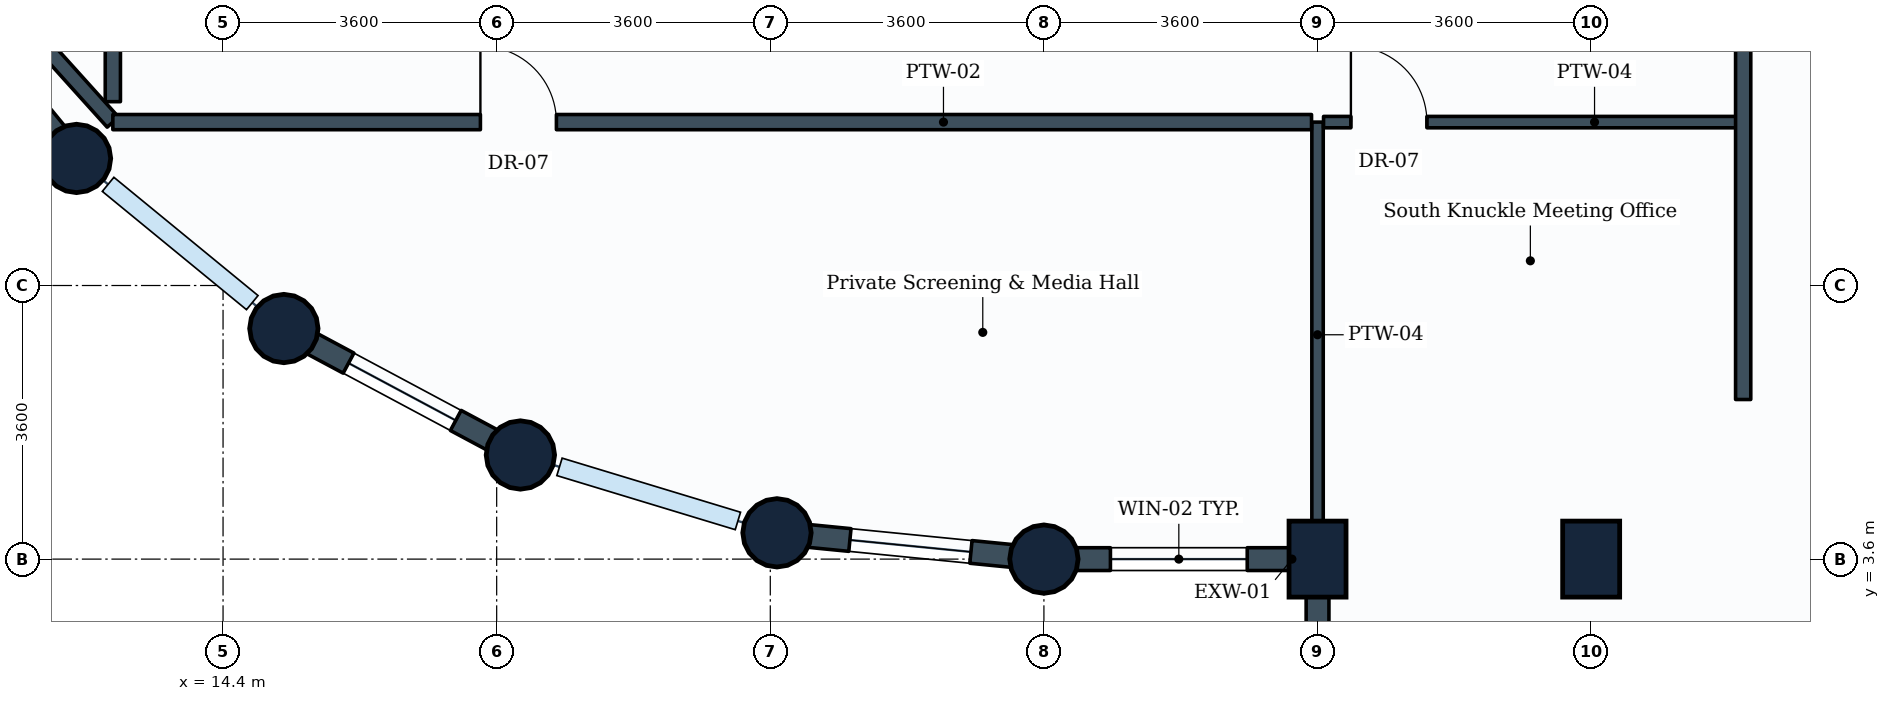
"""IFC4 building model, lengths in metres.
Left out: names, types, materials, properties, quantities, classifications, styles, units other than length and angle.
Written with IfcOpenShell. Run it as: python <this file> out.ifc"""

import sys

from ifc_helpers import new_model, si_unit, direction, frame, frame_2d, origin, origin_2d, place, context, subcontext, project, spatial, rectangle, circle, extrude, element, fill, save


model = new_model("IFC4")
c1 = context("Model", 3, precision=1e-05, world=origin(), true_north=direction((0.0, 1.0)))
c2 = subcontext(c1, "Body", "Model", "MODEL_VIEW")
j1 = project(units=[si_unit("LENGTHUNIT", "METRE"), si_unit("PLANEANGLEUNIT", "RADIAN")], contexts=[c1])
p1 = place(None, origin())
s1 = spatial("IfcSite", under=j1, at=p1, CompositionType="ELEMENT")
p2 = place(p1, origin())
s2 = spatial("IfcBuilding", under=s1, at=p2, CompositionType="ELEMENT")
p3 = place(p2, frame((0.0, 0.0, 135.2)))
s3 = spatial("IfcBuildingStorey", under=s2, at=p3, CompositionType="ELEMENT", Elevation=135.2)
for number, where, z_axis, x_axis in (
    (1, (12.472, 8.872, 0.0), (0.0, 0.0, 1.0), (1.0, 0.0, 0.0)),
    (2, (15.2, 6.634, 0.0), (0.0, 0.0, 1.0), (1.0, 0.0, 0.0)),
    (3, (18.312, 4.97, 0.0), (0.0, 0.0, 1.0), (1.0, 0.0, 0.0)),
    (4, (21.688, 3.946, 0.0), (0.0, 0.0, 1.0), (1.0, 0.0, 0.0)),
    (5, (25.2, 3.6, 0.0), (0.0, 0.0, 1.0), (1.0, 0.0, 0.0)),
):
    element("IfcColumn", number, at=place(p3, frame(where, z_axis=z_axis, x_axis=x_axis)), inside=s3, PredefinedType="COLUMN", context=c2, shape_type="SweptSolid", body=[
        extrude(circle(Radius=0.45, at=origin_2d()), origin(), (0.0, 0.0, 1.0), 3.8),
    ])
for number, where, z_axis, x_axis in (
    (6, (28.8, 3.6, 0.0), (0.0, 0.0, 1.0), (1.0, 0.0, 0.0)),
    (7, (32.4, 3.6, 0.0), (0.0, 0.0, 1.0), (1.0, 0.0, 0.0)),
):
    element("IfcColumn", number, at=place(p3, frame(where, z_axis=z_axis, x_axis=x_axis)), inside=s3, PredefinedType="COLUMN", context=c2, shape_type="SweptSolid", body=[
        extrude(rectangle(XDim=0.75, YDim=1.0, at=origin_2d()), origin(), (0.0, 0.0, 1.0), 3.8),
    ])
p4 = place(p3, frame((28.8, 3.6, 0.0), z_axis=(0.0, 0.0, 1.0), x_axis=(-1.0, 0.0, 0.0)))
e8 = element("IfcWall", 8, at=p4, inside=s3, PredefinedType="STANDARD", context=c2, shape_type="SweptSolid", body=[
    extrude(rectangle(XDim=3.6, YDim=0.3, at=frame_2d((1.8, 0.0))), origin(), (0.0, 0.0, 1.0), 2.93),
])
p5 = place(p4, frame((0.925, 0.0, 0.85)))
e9 = element("IfcOpeningElement", 9, at=p5, cuts=e8, PredefinedType="OPENING", context=c2, shape_type="SweptSolid", body=[
    extrude(rectangle(XDim=1.8, YDim=1.35, at=frame_2d((0.9, 0.675))), frame((0.0, 0.16, 0.0), z_axis=(0.0, -1.0, 0.0), x_axis=(1.0, 0.0, 0.0)), (0.0, 0.0, 1.0), 0.32),
])
p6 = place(p3, frame((28.8, 3.6, 0.0), z_axis=(0.0, 0.0, 1.0), x_axis=(0.0, -1.0, 0.0)))
e10 = element("IfcWall", 10, at=p6, inside=s3, PredefinedType="STANDARD", context=c2, shape_type="SweptSolid", body=[
    extrude(rectangle(XDim=2.1, YDim=0.3, at=frame_2d((1.05, 0.0))), origin(), (0.0, 0.0, 1.0), 2.93),
])
p7 = place(p3, frame((12.472, 8.872, 0.0), z_axis=(0.0, 0.0, 1.0), x_axis=(-0.634258295121, 0.773121216285, 0.0)))
e11 = element("IfcWall", 11, at=p7, inside=s3, PredefinedType="STANDARD", context=c2, shape_type="SweptSolid", body=[
    extrude(rectangle(XDim=3.529, YDim=0.3, at=frame_2d((1.764, 0.0))), origin(), (0.0, 0.0, 1.0), 2.93),
])
p8 = place(p7, frame((0.964, 0.0, 0.85)))
e12 = element("IfcOpeningElement", 12, at=p8, cuts=e11, PredefinedType="OPENING", context=c2, shape_type="SweptSolid", body=[
    extrude(rectangle(XDim=1.6, YDim=1.35, at=frame_2d((0.8, 0.675))), frame((0.0, 0.16, 0.0), z_axis=(0.0, -1.0, 0.0), x_axis=(1.0, 0.0, 0.0)), (0.0, 0.0, 1.0), 0.32),
])
p9 = place(p3, frame((18.312, 4.97, 0.0), z_axis=(0.0, 0.0, 1.0), x_axis=(-0.881846862014, 0.471535907389, 0.0)))
e13 = element("IfcWall", 13, at=p9, inside=s3, PredefinedType="STANDARD", context=c2, shape_type="SweptSolid", body=[
    extrude(rectangle(XDim=3.529, YDim=0.3, at=frame_2d((1.765, 0.0))), origin(), (0.0, 0.0, 1.0), 2.93),
])
p10 = place(p9, frame((0.964, 0.0, 0.85)))
e14 = element("IfcOpeningElement", 14, at=p10, cuts=e13, PredefinedType="OPENING", context=c2, shape_type="SweptSolid", body=[
    extrude(rectangle(XDim=1.6, YDim=1.35, at=frame_2d((0.8, 0.675))), frame((0.0, 0.16, 0.0), z_axis=(0.0, -1.0, 0.0), x_axis=(1.0, 0.0, 0.0)), (0.0, 0.0, 1.0), 0.32),
])
p11 = place(p3, frame((25.2, 3.6, 0.0), z_axis=(0.0, 0.0, 1.0), x_axis=(-0.995183369056, 0.098030923459, 0.0)))
e15 = element("IfcWall", 15, at=p11, inside=s3, PredefinedType="STANDARD", context=c2, shape_type="SweptSolid", body=[
    extrude(rectangle(XDim=3.529, YDim=0.3, at=frame_2d((1.765, 0.0))), origin(), (0.0, 0.0, 1.0), 2.93),
])
p12 = place(p11, frame((0.965, 0.0, 0.85)))
e16 = element("IfcOpeningElement", 16, at=p12, cuts=e15, PredefinedType="OPENING", context=c2, shape_type="SweptSolid", body=[
    extrude(rectangle(XDim=1.6, YDim=1.35, at=frame_2d((0.8, 0.675))), frame((0.0, 0.16, 0.0), z_axis=(0.0, -1.0, 0.0), x_axis=(1.0, 0.0, 0.0)), (0.0, 0.0, 1.0), 0.32),
])
p13 = place(p3, frame((28.8, 9.35, 0.0), z_axis=(0.0, 0.0, 1.0), x_axis=(0.0, -1.0, 0.0)))
e17 = element("IfcWall", 17, at=p13, inside=s3, PredefinedType="PARTITIONING", context=c2, shape_type="SweptSolid", body=[
    extrude(rectangle(XDim=5.596, YDim=0.15, at=frame_2d((2.798, 0.0))), origin(), (0.0, 0.0, 1.0), 3.535),
])
p14 = place(p3, frame((12.95, 9.35, 0.0), z_axis=(0.0, 0.0, 1.0), x_axis=(-0.669433552235, 0.742871939934, 0.0)))
e18 = element("IfcWall", 18, at=p14, inside=s3, PredefinedType="PARTITIONING", context=c2, shape_type="SweptSolid", body=[
    extrude(rectangle(XDim=5.868, YDim=0.2, at=frame_2d((2.934, 0.0))), origin(), (0.0, 0.0, 1.0), 2.93),
])
p15 = place(p3, frame((12.95, 9.619, 0.0), z_axis=(0.0, 0.0, 1.0), x_axis=(0.0, 1.0, 0.0)))
e19 = element("IfcWall", 19, at=p15, inside=s3, PredefinedType="PARTITIONING", context=c2, shape_type="SweptSolid", body=[
    extrude(rectangle(XDim=6.877, YDim=0.2, at=frame_2d((3.438, 0.0))), origin(), (0.0, 0.0, 1.0), 3.17),
])
p16 = place(p15, frame((3.962, 0.0, 0.0)))
e20 = element("IfcOpeningElement", 20, at=p16, cuts=e19, PredefinedType="OPENING", context=c2, shape_type="SweptSolid", body=[
    extrude(rectangle(XDim=1.0, YDim=2.1, at=frame_2d((0.5, 1.05))), frame((0.0, 0.11, 0.0), z_axis=(0.0, -1.0, 0.0), x_axis=(1.0, 0.0, 0.0)), (0.0, 0.0, 1.0), 0.22),
])
p17 = place(p3, frame((12.95, 9.35, 0.0), z_axis=(0.0, 0.0, 1.0), x_axis=(1.0, 0.0, 0.0)))
e21 = element("IfcWall", 21, at=p17, inside=s3, PredefinedType="PARTITIONING", context=c2, shape_type="SweptSolid", body=[
    extrude(rectangle(XDim=15.771, YDim=0.2, at=frame_2d((7.885, 0.0))), origin(), (0.0, 0.0, 1.0), 3.17),
])
p18 = place(p17, frame((4.836, 0.0, 0.0)))
e22 = element("IfcOpeningElement", 22, at=p18, cuts=e21, PredefinedType="OPENING", context=c2, shape_type="SweptSolid", body=[
    extrude(rectangle(XDim=1.0, YDim=2.1, at=frame_2d((0.5, 1.05))), frame((0.0, 0.11, 0.0), z_axis=(0.0, -1.0, 0.0), x_axis=(1.0, 0.0, 0.0)), (0.0, 0.0, 1.0), 0.22),
])
p19 = place(p3, frame((28.879, 9.35, 0.0), z_axis=(0.0, 0.0, 1.0), x_axis=(1.0, 0.0, 0.0)))
e23 = element("IfcWall", 23, at=p19, inside=s3, PredefinedType="PARTITIONING", context=c2, shape_type="SweptSolid", body=[
    extrude(rectangle(XDim=5.521, YDim=0.15, at=frame_2d((2.76, 0.0))), origin(), (0.0, 0.0, 1.0), 3.535),
])
p20 = place(p19, frame((0.36, 0.0, 0.0)))
e24 = element("IfcOpeningElement", 24, at=p20, cuts=e23, PredefinedType="OPENING", context=c2, shape_type="SweptSolid", body=[
    extrude(rectangle(XDim=1.0, YDim=2.1, at=frame_2d((0.5, 1.05))), frame((0.0, 0.085, 0.0), z_axis=(0.0, -1.0, 0.0), x_axis=(1.0, 0.0, 0.0)), (0.0, 0.0, 1.0), 0.17),
])
p21 = place(p3, frame((34.4, 5.7, 0.0), z_axis=(0.0, 0.0, 1.0), x_axis=(0.0, 1.0, 0.0)))
e25 = element("IfcWall", 25, at=p21, inside=s3, PredefinedType="PARTITIONING", context=c2, shape_type="SweptSolid", body=[
    extrude(rectangle(XDim=10.6, YDim=0.2, at=frame_2d((5.3, 0.0))), origin(), (0.0, 0.0, 1.0), 3.17),
])
p22 = place(p5, origin())
e26 = element("IfcWindow", 26, at=p22, inside=s3, PartitioningType="SINGLE_PANEL", PredefinedType="WINDOW", context=c2, shape_type="SweptSolid", body=[
    extrude(rectangle(XDim=1.8, YDim=1.35, at=frame_2d((0.9, 0.675))), frame((0.0, 0.03, 0.0), z_axis=(0.0, -1.0, 0.0), x_axis=(1.0, 0.0, 0.0)), (0.0, 0.0, 1.0), 0.06),
])
fill(e9, e26)
p23 = place(p10, origin())
e27 = element("IfcWindow", 27, at=p23, inside=s3, PartitioningType="SINGLE_PANEL", PredefinedType="WINDOW", context=c2, shape_type="SweptSolid", body=[
    extrude(rectangle(XDim=1.6, YDim=1.35, at=frame_2d((0.8, 0.675))), frame((0.0, 0.03, 0.0), z_axis=(0.0, -1.0, 0.0), x_axis=(1.0, 0.0, 0.0)), (0.0, 0.0, 1.0), 0.06),
])
fill(e14, e27)
p24 = place(p12, origin())
e28 = element("IfcWindow", 28, at=p24, inside=s3, PartitioningType="SINGLE_PANEL", PredefinedType="WINDOW", context=c2, shape_type="SweptSolid", body=[
    extrude(rectangle(XDim=1.6, YDim=1.35, at=frame_2d((0.8, 0.675))), frame((0.0, 0.03, 0.0), z_axis=(0.0, -1.0, 0.0), x_axis=(1.0, 0.0, 0.0)), (0.0, 0.0, 1.0), 0.06),
])
fill(e16, e28)
p25 = place(p18, origin())
e29 = element("IfcDoor", 29, at=p25, inside=s3, OperationType="SINGLE_SWING_LEFT", PredefinedType="DOOR", context=c2, shape_type="SweptSolid", body=[
    extrude(rectangle(XDim=1.0, YDim=2.1, at=frame_2d((0.5, 1.05))), frame((0.0, 0.025, 0.0), z_axis=(0.0, -1.0, 0.0), x_axis=(1.0, 0.0, 0.0)), (0.0, 0.0, 1.0), 0.05),
])
fill(e22, e29)
p26 = place(p20, origin())
e30 = element("IfcDoor", 30, at=p26, inside=s3, OperationType="SINGLE_SWING_LEFT", PredefinedType="DOOR", context=c2, shape_type="SweptSolid", body=[
    extrude(rectangle(XDim=1.0, YDim=2.1, at=frame_2d((0.5, 1.05))), frame((0.0, 0.025, 0.0), z_axis=(0.0, -1.0, 0.0), x_axis=(1.0, 0.0, 0.0)), (0.0, 0.0, 1.0), 0.05),
])
fill(e24, e30)
save(model, sys.argv[1])
